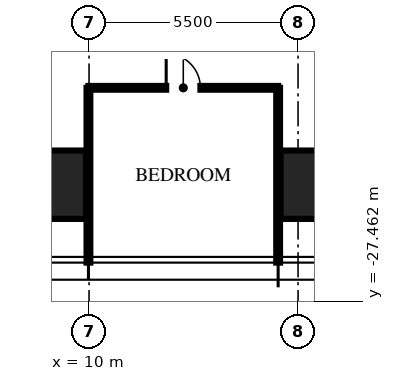
"""IFC4 building model, lengths in metres.
Left out: names, types, materials, properties, quantities, classifications, styles, units other than length and angle.
Written with IfcOpenShell. Run it as: python <this file> out.ifc"""

import sys

from ifc_helpers import new_model, si_unit, direction, frame, frame_2d, origin, origin_2d, place, context, subcontext, project, spatial, rectangle, hollow_rectangle, extrude, element, fill, save


model = new_model("IFC4")
c1 = context("Model", 3, precision=1e-05, world=origin(), true_north=direction((0.0, 1.0)))
c2 = subcontext(c1, "Body", "Model", "MODEL_VIEW")
j1 = project(units=[si_unit("LENGTHUNIT", "METRE"), si_unit("PLANEANGLEUNIT", "RADIAN")], contexts=[c1])
p1 = place(None, origin())
s1 = spatial("IfcSite", under=j1, at=p1, CompositionType="ELEMENT")
p2 = place(p1, origin())
s2 = spatial("IfcBuilding", under=s1, at=p2, CompositionType="ELEMENT")
p3 = place(p2, frame((0.0, 0.0, 207.0)))
s3 = spatial("IfcBuildingStorey", under=s2, at=p3, CompositionType="ELEMENT", Elevation=207.0)
for number, where, z_axis, x_axis in (
    (1, (16.64, -24.4, 0.0), (0.0, 0.0, 1.0), (1.0, 0.0, 0.0)),
    (2, (8.32, -24.4, 0.0), (0.0, 0.0, 1.0), (1.0, 0.0, 0.0)),
):
    element("IfcColumn", number, at=place(p3, frame(where, z_axis=z_axis, x_axis=x_axis)), inside=s3, PredefinedType="COLUMN", context=c2, shape_type="SweptSolid", body=[
        extrude(hollow_rectangle(XDim=3.2, YDim=1.8, WallThickness=0.2, at=origin_2d()), origin(), (0.0, 0.0, 1.0), 3.75),
    ])
for number, where, z_axis, x_axis in (
    (3, (9.984, -21.85, 0.0), (0.0, 0.0, 1.0), (0.0, -1.0, 0.0)),
    (4, (14.976, -21.85, 0.0), (0.0, 0.0, 1.0), (0.0, -1.0, 0.0)),
):
    element("IfcWall", number, at=place(p3, frame(where, z_axis=z_axis, x_axis=x_axis)), inside=s3, PredefinedType="PARTITIONING", context=c2, shape_type="SweptSolid", body=[
        extrude(rectangle(XDim=4.6, YDim=0.1, at=frame_2d((2.3, 0.0))), origin(), (0.0, 0.0, 1.0), 2.91),
    ])
p4 = place(p3, frame((9.984, -21.85, 0.0), z_axis=(0.0, 0.0, 1.0), x_axis=(1.0, 0.0, 0.0)))
e5 = element("IfcWall", 5, at=p4, inside=s3, PredefinedType="PARTITIONING", context=c2, shape_type="SweptSolid", body=[
    extrude(rectangle(XDim=4.992, YDim=0.1, at=frame_2d((2.496, 0.0))), origin(), (0.0, 0.0, 1.0), 2.81),
])
p5 = place(p4, frame((2.046, 0.0, 0.0)))
e6 = element("IfcOpeningElement", 6, at=p5, cuts=e5, PredefinedType="OPENING", context=c2, shape_type="SweptSolid", body=[
    extrude(rectangle(XDim=0.9, YDim=2.1, at=frame_2d((0.45, 1.05))), frame((0.0, 0.06, 0.0), z_axis=(0.0, -1.0, 0.0), x_axis=(1.0, 0.0, 0.0)), (0.0, 0.0, 1.0), 0.12),
])
p6 = place(p5, origin())
e7 = element("IfcDoor", 7, at=p6, inside=s3, OperationType="SINGLE_SWING_LEFT", PredefinedType="DOOR", context=c2, shape_type="SweptSolid", body=[
    extrude(rectangle(XDim=0.9, YDim=2.1, at=frame_2d((0.45, 1.05))), frame((0.0, 0.025, 0.0), z_axis=(0.0, -1.0, 0.0), x_axis=(1.0, 0.0, 0.0)), (0.0, 0.0, 1.0), 0.05),
])
fill(e6, e7)
save(model, sys.argv[1])
